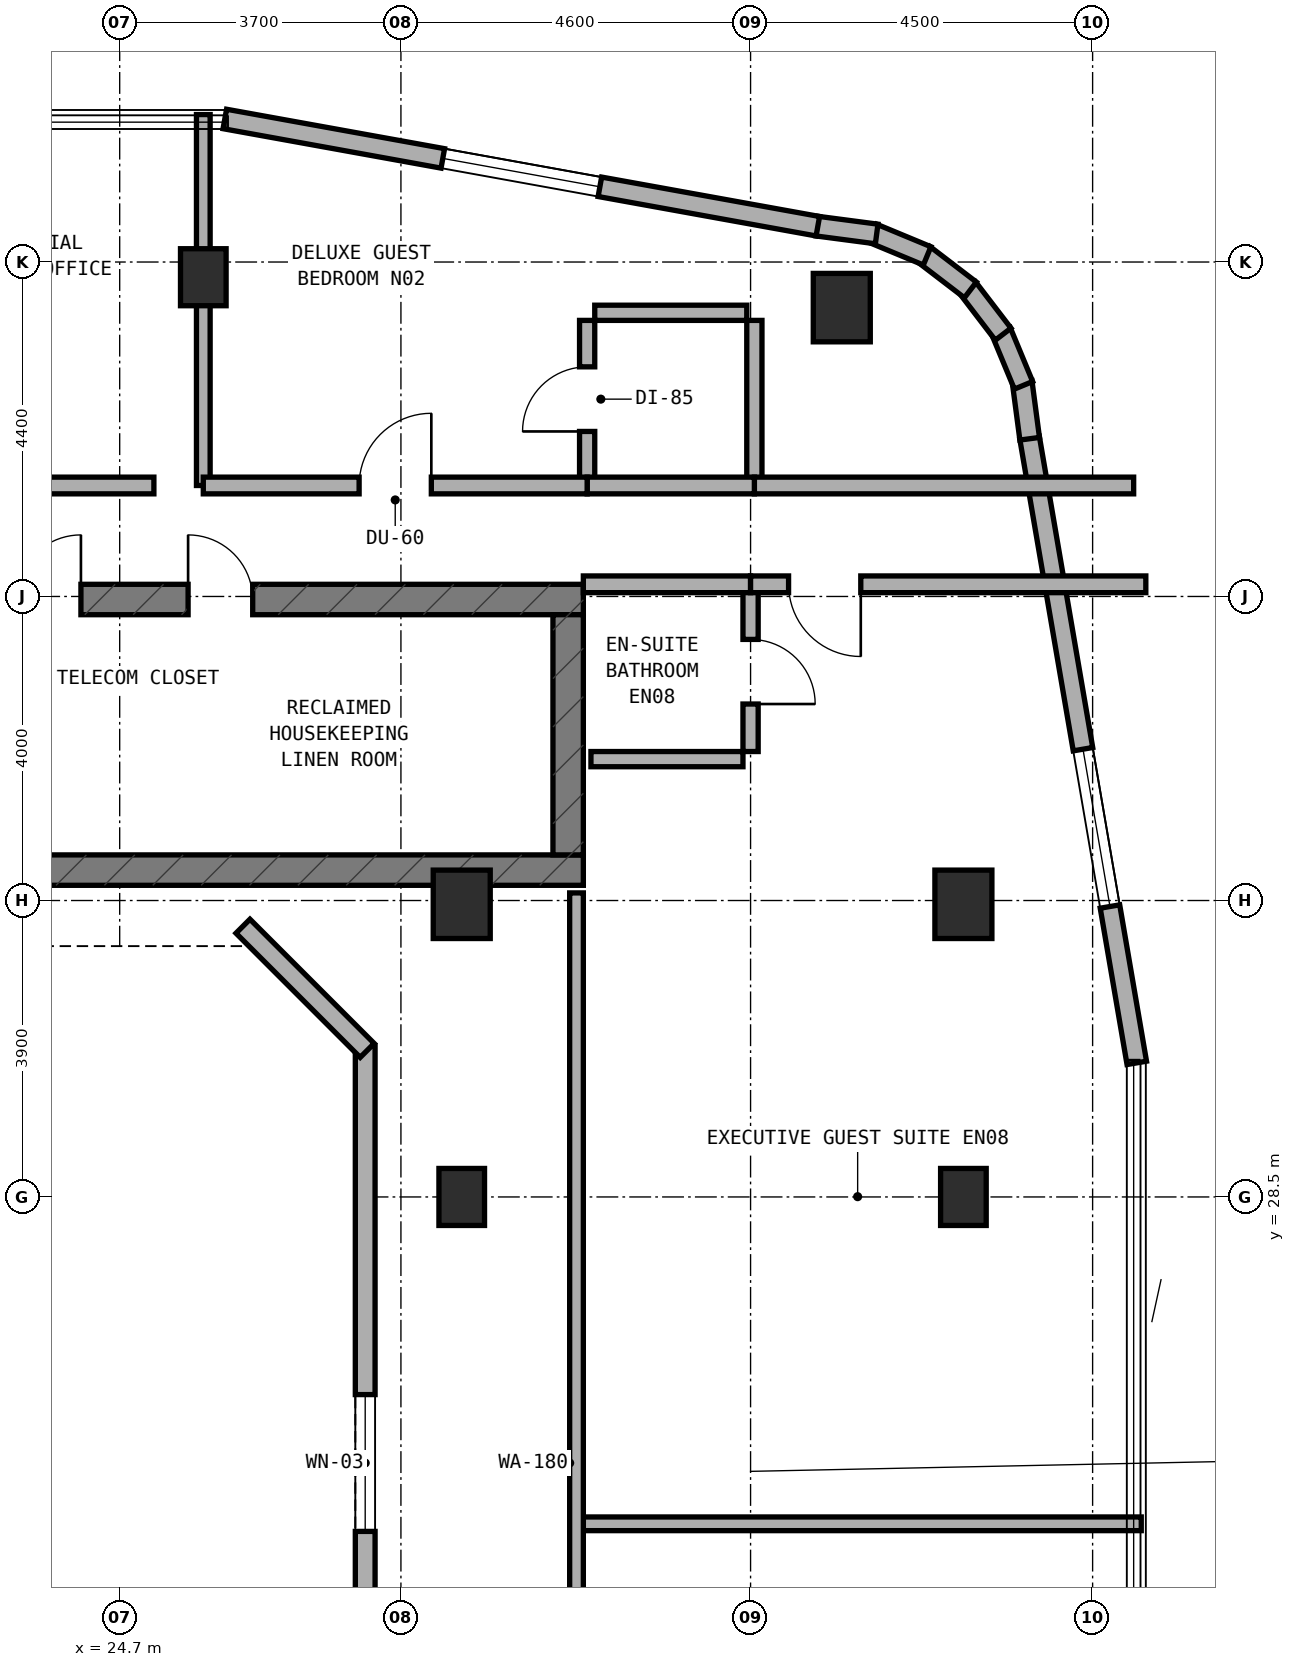
"""IFC4 building model, lengths in metres.
Left out: names, types, materials, properties, quantities, classifications, styles, units other than length and angle.
Written with IfcOpenShell. Run it as: python <this file> out.ifc"""

import sys

from ifc_helpers import new_model, si_unit, direction, frame, frame_2d, origin, origin_2d, place, context, subcontext, project, spatial, rectangle, extrude, element, fill, save


model = new_model("IFC4")
c1 = context("Model", 3, precision=1e-05, world=origin(), true_north=direction((0.0, 1.0)))
c2 = subcontext(c1, "Body", "Model", "MODEL_VIEW")
j1 = project(units=[si_unit("LENGTHUNIT", "METRE"), si_unit("PLANEANGLEUNIT", "RADIAN")], contexts=[c1])
p1 = place(None, origin())
s1 = spatial("IfcSite", under=j1, at=p1, CompositionType="ELEMENT")
p2 = place(p1, origin())
s2 = spatial("IfcBuilding", under=s1, at=p2, CompositionType="ELEMENT")
p3 = place(p2, frame((0.0, 0.0, 257.6)))
s3 = spatial("IfcBuildingStorey", under=s2, at=p3, CompositionType="ELEMENT", Elevation=257.6)
p4 = place(p3, frame((6.4, 32.8, 0.0), z_axis=(0.0, 0.0, 1.0), x_axis=(1.0, 0.0, 0.0)))
e1 = element("IfcWall", 1, at=p4, inside=s3, PredefinedType="SHEAR", context=c2, shape_type="SweptSolid", body=[
    extrude(rectangle(XDim=24.4, YDim=0.4, at=frame_2d((12.2, 0.0))), origin(), (0.0, 0.0, 1.0), 3.6),
])
p5 = place(p4, frame((6.05, 0.0, 0.0)))
e2 = element("IfcOpeningElement", 2, at=p5, cuts=e1, PredefinedType="OPENING", context=c2, shape_type="SweptSolid", body=[
    extrude(rectangle(XDim=1.1, YDim=2.15, at=frame_2d((0.55, 1.075))), frame((0.0, 0.21, 0.0), z_axis=(0.0, -1.0, 0.0), x_axis=(1.0, 0.0, 0.0)), (0.0, 0.0, 1.0), 0.42),
])
p6 = place(p3, frame((6.4, 36.36, 0.0), z_axis=(0.0, 0.0, 1.0), x_axis=(1.0, 0.0, 0.0)))
e3 = element("IfcWall", 3, at=p6, inside=s3, PredefinedType="SHEAR", context=c2, shape_type="SweptSolid", body=[
    extrude(rectangle(XDim=24.4, YDim=0.4, at=frame_2d((12.2, 0.0))), origin(), (0.0, 0.0, 1.0), 3.6),
])
p7 = place(p6, frame((9.15, 0.0, 0.0)))
e4 = element("IfcOpeningElement", 4, at=p7, cuts=e3, PredefinedType="OPENING", context=c2, shape_type="SweptSolid", body=[
    extrude(rectangle(XDim=1.2, YDim=2.15, at=frame_2d((0.6, 1.075))), frame((0.0, 0.21, 0.0), z_axis=(0.0, -1.0, 0.0), x_axis=(1.0, 0.0, 0.0)), (0.0, 0.0, 1.0), 0.42),
])
p8 = place(p6, frame((19.2, 0.0, 0.0)))
e5 = element("IfcOpeningElement", 5, at=p8, cuts=e3, PredefinedType="OPENING", context=c2, shape_type="SweptSolid", body=[
    extrude(rectangle(XDim=0.85, YDim=2.1, at=frame_2d((0.425, 1.05))), frame((0.0, 0.21, 0.0), z_axis=(0.0, -1.0, 0.0), x_axis=(1.0, 0.0, 0.0)), (0.0, 0.0, 1.0), 0.42),
])
p9 = place(p6, frame((16.94, 0.0, 0.0)))
e6 = element("IfcOpeningElement", 6, at=p9, cuts=e3, PredefinedType="OPENING", context=c2, shape_type="SweptSolid", body=[
    extrude(rectangle(XDim=0.85, YDim=2.1, at=frame_2d((0.425, 1.05))), frame((0.0, 0.21, 0.0), z_axis=(0.0, -1.0, 0.0), x_axis=(1.0, 0.0, 0.0)), (0.0, 0.0, 1.0), 0.42),
])
p10 = place(p3, frame((30.6, 33.0, 0.0), z_axis=(0.0, 0.0, 1.0), x_axis=(0.0, 1.0, 0.0)))
e7 = element("IfcWall", 7, at=p10, inside=s3, PredefinedType="SHEAR", context=c2, shape_type="SweptSolid", body=[
    extrude(rectangle(XDim=3.16, YDim=0.4, at=frame_2d((1.58, 0.0))), origin(), (0.0, 0.0, 1.0), 3.6),
])
p11 = place(p3, frame((25.8, 40.6, 0.0), z_axis=(0.0, 0.0, 1.0), x_axis=(1.0, 0.0, 0.0)))
e8 = element("IfcColumn", 8, at=p11, inside=s3, PredefinedType="COLUMN", context=c2, shape_type="SweptSolid", body=[
    extrude(rectangle(XDim=0.6, YDim=0.75, at=origin_2d()), origin(), (0.0, 0.0, 1.0), 3.6),
])
p12 = place(p3, frame((34.2, 40.2, 0.0), z_axis=(0.0, 0.0, 1.0), x_axis=(1.0, 0.0, 0.0)))
e9 = element("IfcColumn", 9, at=p12, inside=s3, PredefinedType="COLUMN", context=c2, shape_type="SweptSolid", body=[
    extrude(rectangle(XDim=0.75, YDim=0.9, at=origin_2d()), origin(), (0.0, 0.0, 1.0), 3.6),
])
p13 = place(p3, frame((35.8, 28.5, 0.0), z_axis=(0.0, 0.0, 1.0), x_axis=(1.0, 0.0, 0.0)))
e10 = element("IfcColumn", 10, at=p13, inside=s3, PredefinedType="COLUMN", context=c2, shape_type="SweptSolid", body=[
    extrude(rectangle(XDim=0.6, YDim=0.75, at=origin_2d()), origin(), (0.0, 0.0, 1.0), 3.6),
])
for number, where, z_axis, x_axis in (
    (11, (35.8, 32.35, 0.0), (0.0, 0.0, 1.0), (1.0, 0.0, 0.0)),
    (12, (29.2, 32.35, 0.0), (0.0, 0.0, 1.0), (1.0, 0.0, 0.0)),
):
    element("IfcColumn", number, at=place(p3, frame(where, z_axis=z_axis, x_axis=x_axis)), inside=s3, PredefinedType="COLUMN", context=c2, shape_type="SweptSolid", body=[
        extrude(rectangle(XDim=0.75, YDim=0.9, at=origin_2d()), origin(), (0.0, 0.0, 1.0), 3.6),
    ])
p14 = place(p3, frame((29.2, 28.5, 0.0), z_axis=(0.0, 0.0, 1.0), x_axis=(1.0, 0.0, 0.0)))
e13 = element("IfcColumn", 13, at=p14, inside=s3, PredefinedType="COLUMN", context=c2, shape_type="SweptSolid", body=[
    extrude(rectangle(XDim=0.6, YDim=0.75, at=origin_2d()), origin(), (0.0, 0.0, 1.0), 3.6),
])
p15 = place(p3, frame((38.081, 30.264, 0.0), z_axis=(0.0, 0.0, 1.0), x_axis=(-0.169038545376, 0.985609440994, 0.0)))
e14 = element("IfcWall", 14, at=p15, inside=s3, PredefinedType="STANDARD", context=c2, shape_type="SweptSolid", body=[
    extrude(rectangle(XDim=8.342, YDim=0.26, at=frame_2d((4.171, 0.0))), origin(), (0.0, 0.0, 1.0), 3.32),
])
p16 = place(p15, frame((2.087, 0.0, 0.85)))
e15 = element("IfcOpeningElement", 15, at=p16, cuts=e14, PredefinedType="OPENING", context=c2, shape_type="SweptSolid", body=[
    extrude(rectangle(XDim=2.1, YDim=1.5, at=frame_2d((1.05, 0.75))), frame((0.0, 0.14, 0.0), z_axis=(0.0, -1.0, 0.0), x_axis=(1.0, 0.0, 0.0)), (0.0, 0.0, 1.0), 0.28),
])
p17 = place(p3, frame((36.672, 38.475, 0.0), z_axis=(0.0, 0.0, 1.0), x_axis=(-0.131190038694, 0.991357238208, 0.0)))
e16 = element("IfcWall", 16, at=p17, inside=s3, PredefinedType="STANDARD", context=c2, shape_type="SweptSolid", body=[
    extrude(rectangle(XDim=0.756, YDim=0.26, at=frame_2d((0.378, 0.0))), origin(), (0.0, 0.0, 1.0), 3.32),
])
p18 = place(p3, frame((36.591, 39.178, 0.0), z_axis=(0.0, 0.0, 1.0), x_axis=(-0.383515061956, 0.923534621578, 0.0)))
e17 = element("IfcWall", 17, at=p18, inside=s3, PredefinedType="STANDARD", context=c2, shape_type="SweptSolid", body=[
    extrude(rectangle(XDim=0.772, YDim=0.26, at=frame_2d((0.386, 0.0))), origin(), (0.0, 0.0, 1.0), 3.32),
])
for number, where, z_axis, x_axis in (
    (18, (36.323, 39.851, 0.0), (0.0, 0.0, 1.0), (-0.608, 0.794, 0.0)),
    (19, (35.892, 40.433, 0.0), (0.0, 0.0, 1.0), (-0.794, 0.608, 0.0)),
    (20, (35.323, 40.881, 0.0), (0.0, 0.0, 1.0), (-0.924, 0.383, 0.0)),
):
    element("IfcWall", number, at=place(p3, frame(where, z_axis=z_axis, x_axis=x_axis)), inside=s3, PredefinedType="STANDARD", context=c2, shape_type="SweptSolid", body=[
        extrude(rectangle(XDim=0.772, YDim=0.26, at=frame_2d((0.386, 0.0))), origin(), (0.0, 0.0, 1.0), 3.32),
    ])
p19 = place(p3, frame((34.659, 41.169, 0.0), z_axis=(0.0, 0.0, 1.0), x_axis=(-0.991474252313, 0.130302751316, 0.0)))
e21 = element("IfcWall", 21, at=p19, inside=s3, PredefinedType="STANDARD", context=c2, shape_type="SweptSolid", body=[
    extrude(rectangle(XDim=0.791, YDim=0.26, at=frame_2d((0.396, 0.0))), origin(), (0.0, 0.0, 1.0), 3.32),
])
p20 = place(p3, frame((33.885, 41.271, 0.0), z_axis=(0.0, 0.0, 1.0), x_axis=(-0.984039441158, 0.177950493803, 0.0)))
e22 = element("IfcWall", 22, at=p20, inside=s3, PredefinedType="STANDARD", context=c2, shape_type="SweptSolid", body=[
    extrude(rectangle(XDim=7.928, YDim=0.26, at=frame_2d((3.964, 0.0))), origin(), (0.0, 0.0, 1.0), 3.32),
])
p21 = place(p20, frame((2.914, 0.0, 0.85)))
e23 = element("IfcOpeningElement", 23, at=p21, cuts=e22, PredefinedType="OPENING", context=c2, shape_type="SweptSolid", body=[
    extrude(rectangle(XDim=2.1, YDim=1.5, at=frame_2d((1.05, 0.75))), frame((0.0, 0.14, 0.0), z_axis=(0.0, -1.0, 0.0), x_axis=(1.0, 0.0, 0.0)), (0.0, 0.0, 1.0), 0.28),
])
p22 = place(p3, frame((27.93, 19.51, 0.0), z_axis=(0.0, 0.0, 1.0), x_axis=(0.0, 1.0, 0.0)))
e24 = element("IfcWall", 24, at=p22, inside=s3, PredefinedType="STANDARD", context=c2, shape_type="SweptSolid", body=[
    extrude(rectangle(XDim=10.98, YDim=0.26, at=frame_2d((5.49, 0.0))), origin(), (0.0, 0.0, 1.0), 3.32),
])
p23 = place(p22, frame((4.59, 0.0, 0.85)))
e25 = element("IfcOpeningElement", 25, at=p23, cuts=e24, PredefinedType="OPENING", context=c2, shape_type="SweptSolid", body=[
    extrude(rectangle(XDim=1.8, YDim=1.5, at=frame_2d((0.9, 0.75))), frame((0.0, 0.14, 0.0), z_axis=(0.0, -1.0, 0.0), x_axis=(1.0, 0.0, 0.0)), (0.0, 0.0, 1.0), 0.28),
])
p24 = place(p3, frame((27.956, 30.428, 0.0), z_axis=(0.0, 0.0, 1.0), x_axis=(-0.707106781187, 0.707106781187, 0.0)))
e26 = element("IfcWall", 26, at=p24, inside=s3, PredefinedType="STANDARD", context=c2, shape_type="SweptSolid", body=[
    extrude(rectangle(XDim=2.311, YDim=0.26, at=frame_2d((1.155, 0.0))), origin(), (0.0, 0.0, 1.0), 3.32),
])
p25 = place(p3, frame((21.45, 37.86, 0.0), z_axis=(0.0, 0.0, 1.0), x_axis=(1.0, 0.0, 0.0)))
e27 = element("IfcWall", 27, at=p25, inside=s3, PredefinedType="SOLIDWALL", context=c2, shape_type="SweptSolid", body=[
    extrude(rectangle(XDim=3.7, YDim=0.22, at=frame_2d((1.85, 0.0))), origin(), (0.0, 0.0, 1.0), 3.32),
])
p26 = place(p25, frame((1.16, 0.0, 0.0)))
e28 = element("IfcOpeningElement", 28, at=p26, cuts=e27, PredefinedType="OPENING", context=c2, shape_type="SweptSolid", body=[
    extrude(rectangle(XDim=1.1, YDim=2.1, at=frame_2d((0.55, 1.05))), frame((0.0, 0.12, 0.0), z_axis=(0.0, -1.0, 0.0), x_axis=(1.0, 0.0, 0.0)), (0.0, 0.0, 1.0), 0.24),
])
p27 = place(p3, frame((25.8, 37.86, 0.0), z_axis=(0.0, 0.0, 1.0), x_axis=(0.0, 1.0, 0.0)))
e29 = element("IfcWall", 29, at=p27, inside=s3, PredefinedType="SOLIDWALL", context=c2, shape_type="SweptSolid", body=[
    extrude(rectangle(XDim=4.88, YDim=0.18, at=frame_2d((2.44, 0.0))), origin(), (0.0, 0.0, 1.0), 2.795),
])
p28 = place(p3, frame((30.85, 37.96, 0.0), z_axis=(0.0, 0.0, 1.0), x_axis=(0.0, 1.0, 0.0)))
e30 = element("IfcWall", 30, at=p28, inside=s3, PredefinedType="PLUMBINGWALL", context=c2, shape_type="SweptSolid", body=[
    extrude(rectangle(XDim=2.072, YDim=0.2, at=frame_2d((1.036, 0.0))), origin(), (0.0, 0.0, 1.0), 2.895),
])
p29 = place(p28, frame((0.611, 0.0, 0.0)))
e31 = element("IfcOpeningElement", 31, at=p29, cuts=e30, PredefinedType="OPENING", context=c2, shape_type="SweptSolid", body=[
    extrude(rectangle(XDim=0.85, YDim=2.1, at=frame_2d((0.425, 1.05))), frame((0.0, 0.11, 0.0), z_axis=(0.0, -1.0, 0.0), x_axis=(1.0, 0.0, 0.0)), (0.0, 0.0, 1.0), 0.22),
])
p30 = place(p3, frame((30.95, 40.132, 0.0), z_axis=(0.0, 0.0, 1.0), x_axis=(1.0, 0.0, 0.0)))
e32 = element("IfcWall", 32, at=p30, inside=s3, PredefinedType="PLUMBINGWALL", context=c2, shape_type="SweptSolid", body=[
    extrude(rectangle(XDim=2.0, YDim=0.2, at=frame_2d((1.0, 0.0))), origin(), (0.0, 0.0, 1.0), 3.015),
])
p31 = place(p3, frame((33.05, 37.96, 0.0), z_axis=(0.0, 0.0, 1.0), x_axis=(0.0, 1.0, 0.0)))
e33 = element("IfcWall", 33, at=p31, inside=s3, PredefinedType="PLUMBINGWALL", context=c2, shape_type="SweptSolid", body=[
    extrude(rectangle(XDim=2.072, YDim=0.2, at=frame_2d((1.036, 0.0))), origin(), (0.0, 0.0, 1.0), 2.895),
])
p32 = place(p3, frame((33.05, 37.86, 0.0), z_axis=(0.0, 0.0, 1.0), x_axis=(1.0, 0.0, 0.0)))
e34 = element("IfcWall", 34, at=p32, inside=s3, PredefinedType="SOLIDWALL", context=c2, shape_type="SweptSolid", body=[
    extrude(rectangle(XDim=4.99, YDim=0.22, at=frame_2d((2.495, 0.0))), origin(), (0.0, 0.0, 1.0), 2.795),
])
p33 = place(p3, frame((30.85, 37.86, 0.0), z_axis=(0.0, 0.0, 1.0), x_axis=(1.0, 0.0, 0.0)))
e35 = element("IfcWall", 35, at=p33, inside=s3, PredefinedType="SOLIDWALL", context=c2, shape_type="SweptSolid", body=[
    extrude(rectangle(XDim=2.2, YDim=0.22, at=frame_2d((1.1, 0.0))), origin(), (0.0, 0.0, 1.0), 3.32),
])
p34 = place(p3, frame((25.8, 37.86, 0.0), z_axis=(0.0, 0.0, 1.0), x_axis=(1.0, 0.0, 0.0)))
e36 = element("IfcWall", 36, at=p34, inside=s3, PredefinedType="SOLIDWALL", context=c2, shape_type="SweptSolid", body=[
    extrude(rectangle(XDim=5.05, YDim=0.22, at=frame_2d((2.525, 0.0))), origin(), (0.0, 0.0, 1.0), 2.795),
])
p35 = place(p34, frame((2.05, 0.0, 0.0)))
e37 = element("IfcOpeningElement", 37, at=p35, cuts=e36, PredefinedType="OPENING", context=c2, shape_type="SweptSolid", body=[
    extrude(rectangle(XDim=0.95, YDim=2.1, at=frame_2d((0.475, 1.05))), frame((0.0, 0.12, 0.0), z_axis=(0.0, -1.0, 0.0), x_axis=(1.0, 0.0, 0.0)), (0.0, 0.0, 1.0), 0.24),
])
p36 = place(p3, frame((30.8, 24.2, 0.0), z_axis=(0.0, 0.0, 1.0), x_axis=(1.0, 0.0, 0.0)))
e38 = element("IfcWall", 38, at=p36, inside=s3, PredefinedType="SOLIDWALL", context=c2, shape_type="SweptSolid", body=[
    extrude(rectangle(XDim=7.34, YDim=0.18, at=frame_2d((3.67, 0.0))), origin(), (0.0, 0.0, 1.0), 3.015),
])
p37 = place(p3, frame((30.71, 17.5, 0.0), z_axis=(0.0, 0.0, 1.0), x_axis=(0.0, 1.0, 0.0)))
e39 = element("IfcWall", 39, at=p37, inside=s3, PredefinedType="SOLIDWALL", context=c2, shape_type="SweptSolid", body=[
    extrude(rectangle(XDim=15.0, YDim=0.18, at=frame_2d((7.5, 0.0))), origin(), (0.0, 0.0, 1.0), 2.795),
])
p38 = place(p3, frame((33.0, 34.36, 0.0), z_axis=(0.0, 0.0, 1.0), x_axis=(0.0, 1.0, 0.0)))
e40 = element("IfcWall", 40, at=p38, inside=s3, PredefinedType="PLUMBINGWALL", context=c2, shape_type="SweptSolid", body=[
    extrude(rectangle(XDim=2.1, YDim=0.2, at=frame_2d((1.05, 0.0))), origin(), (0.0, 0.0, 1.0), 3.32),
])
p39 = place(p38, frame((0.625, 0.0, 0.0)))
e41 = element("IfcOpeningElement", 41, at=p39, cuts=e40, PredefinedType="OPENING", context=c2, shape_type="SweptSolid", body=[
    extrude(rectangle(XDim=0.85, YDim=2.1, at=frame_2d((0.425, 1.05))), frame((0.0, 0.11, 0.0), z_axis=(0.0, -1.0, 0.0), x_axis=(1.0, 0.0, 0.0)), (0.0, 0.0, 1.0), 0.22),
])
p40 = place(p3, frame((30.9, 34.26, 0.0), z_axis=(0.0, 0.0, 1.0), x_axis=(1.0, 0.0, 0.0)))
e42 = element("IfcWall", 42, at=p40, inside=s3, PredefinedType="PLUMBINGWALL", context=c2, shape_type="SweptSolid", body=[
    extrude(rectangle(XDim=2.0, YDim=0.2, at=frame_2d((1.0, 0.0))), origin(), (0.0, 0.0, 1.0), 3.32),
])
p41 = place(p3, frame((30.8, 36.56, 0.0), z_axis=(0.0, 0.0, 1.0), x_axis=(1.0, 0.0, 0.0)))
e43 = element("IfcWall", 43, at=p41, inside=s3, PredefinedType="SOLIDWALL", context=c2, shape_type="SweptSolid", body=[
    extrude(rectangle(XDim=2.2, YDim=0.22, at=frame_2d((1.1, 0.0))), origin(), (0.0, 0.0, 1.0), 3.32),
])
p42 = place(p3, frame((33.0, 36.56, 0.0), z_axis=(0.0, 0.0, 1.0), x_axis=(1.0, 0.0, 0.0)))
e44 = element("IfcWall", 44, at=p42, inside=s3, PredefinedType="SOLIDWALL", context=c2, shape_type="SweptSolid", body=[
    extrude(rectangle(XDim=5.2, YDim=0.22, at=frame_2d((2.6, 0.0))), origin(), (0.0, 0.0, 1.0), 2.795),
])
p43 = place(p42, frame((0.5, 0.0, 0.0)))
e45 = element("IfcOpeningElement", 45, at=p43, cuts=e44, PredefinedType="OPENING", context=c2, shape_type="SweptSolid", body=[
    extrude(rectangle(XDim=0.95, YDim=2.1, at=frame_2d((0.475, 1.05))), frame((0.0, 0.12, 0.0), z_axis=(0.0, -1.0, 0.0), x_axis=(1.0, 0.0, 0.0)), (0.0, 0.0, 1.0), 0.24),
])
p44 = place(p16, origin())
e46 = element("IfcWindow", 46, at=p44, inside=s3, PartitioningType="SINGLE_PANEL", PredefinedType="WINDOW", context=c2, shape_type="SweptSolid", body=[
    extrude(rectangle(XDim=2.1, YDim=1.5, at=frame_2d((1.05, 0.75))), frame((0.0, 0.03, 0.0), z_axis=(0.0, -1.0, 0.0), x_axis=(1.0, 0.0, 0.0)), (0.0, 0.0, 1.0), 0.06),
])
fill(e15, e46)
p45 = place(p21, origin())
e47 = element("IfcWindow", 47, at=p45, inside=s3, PartitioningType="SINGLE_PANEL", PredefinedType="WINDOW", context=c2, shape_type="SweptSolid", body=[
    extrude(rectangle(XDim=2.1, YDim=1.5, at=frame_2d((1.05, 0.75))), frame((0.0, 0.03, 0.0), z_axis=(0.0, -1.0, 0.0), x_axis=(1.0, 0.0, 0.0)), (0.0, 0.0, 1.0), 0.06),
])
fill(e23, e47)
p46 = place(p23, origin())
e48 = element("IfcWindow", 48, at=p46, inside=s3, PartitioningType="SINGLE_PANEL", PredefinedType="WINDOW", context=c2, shape_type="SweptSolid", body=[
    extrude(rectangle(XDim=1.8, YDim=1.5, at=frame_2d((0.9, 0.75))), frame((0.0, 0.03, 0.0), z_axis=(0.0, -1.0, 0.0), x_axis=(1.0, 0.0, 0.0)), (0.0, 0.0, 1.0), 0.06),
])
fill(e25, e48)
p47 = place(p8, origin())
e49 = element("IfcDoor", 49, at=p47, inside=s3, OperationType="SINGLE_SWING_LEFT", PredefinedType="DOOR", context=c2, shape_type="SweptSolid", body=[
    extrude(rectangle(XDim=0.85, YDim=2.1, at=frame_2d((0.425, 1.05))), frame((0.0, 0.025, 0.0), z_axis=(0.0, -1.0, 0.0), x_axis=(1.0, 0.0, 0.0)), (0.0, 0.0, 1.0), 0.05),
])
fill(e5, e49)
p48 = place(p9, origin())
e50 = element("IfcDoor", 50, at=p48, inside=s3, OperationType="SINGLE_SWING_RIGHT", PredefinedType="DOOR", context=c2, shape_type="SweptSolid", body=[
    extrude(rectangle(XDim=0.85, YDim=2.1, at=frame_2d((0.425, 1.05))), frame((0.0, 0.025, 0.0), z_axis=(0.0, -1.0, 0.0), x_axis=(1.0, 0.0, 0.0)), (0.0, 0.0, 1.0), 0.05),
])
fill(e6, e50)
p49 = place(p29, origin())
e51 = element("IfcDoor", 51, at=p49, inside=s3, OperationType="SINGLE_SWING_LEFT", PredefinedType="DOOR", context=c2, shape_type="SweptSolid", body=[
    extrude(rectangle(XDim=0.85, YDim=2.1, at=frame_2d((0.425, 1.05))), frame((0.0, 0.025, 0.0), z_axis=(0.0, -1.0, 0.0), x_axis=(1.0, 0.0, 0.0)), (0.0, 0.0, 1.0), 0.05),
])
fill(e31, e51)
p50 = place(p35, origin())
e52 = element("IfcDoor", 52, at=p50, inside=s3, OperationType="SINGLE_SWING_RIGHT", PredefinedType="DOOR", context=c2, shape_type="SweptSolid", body=[
    extrude(rectangle(XDim=0.95, YDim=2.1, at=frame_2d((0.475, 1.05))), frame((0.0, 0.025, 0.0), z_axis=(0.0, -1.0, 0.0), x_axis=(1.0, 0.0, 0.0)), (0.0, 0.0, 1.0), 0.05),
])
fill(e37, e52)
p51 = place(p39, frame((0.85, 0.0, 0.0), z_axis=(0.0, 0.0, 1.0), x_axis=(-1.0, 0.0, 0.0)))
e53 = element("IfcDoor", 53, at=p51, inside=s3, OperationType="SINGLE_SWING_RIGHT", PredefinedType="DOOR", context=c2, shape_type="SweptSolid", body=[
    extrude(rectangle(XDim=0.85, YDim=2.1, at=frame_2d((0.425, 1.05))), frame((0.0, 0.025, 0.0), z_axis=(0.0, -1.0, 0.0), x_axis=(1.0, 0.0, 0.0)), (0.0, 0.0, 1.0), 0.05),
])
fill(e41, e53)
p52 = place(p43, frame((0.95, 0.0, 0.0), z_axis=(0.0, 0.0, 1.0), x_axis=(-1.0, 0.0, 0.0)))
e54 = element("IfcDoor", 54, at=p52, inside=s3, OperationType="SINGLE_SWING_LEFT", PredefinedType="DOOR", context=c2, shape_type="SweptSolid", body=[
    extrude(rectangle(XDim=0.95, YDim=2.1, at=frame_2d((0.475, 1.05))), frame((0.0, 0.025, 0.0), z_axis=(0.0, -1.0, 0.0), x_axis=(1.0, 0.0, 0.0)), (0.0, 0.0, 1.0), 0.05),
])
fill(e45, e54)
save(model, sys.argv[1])
